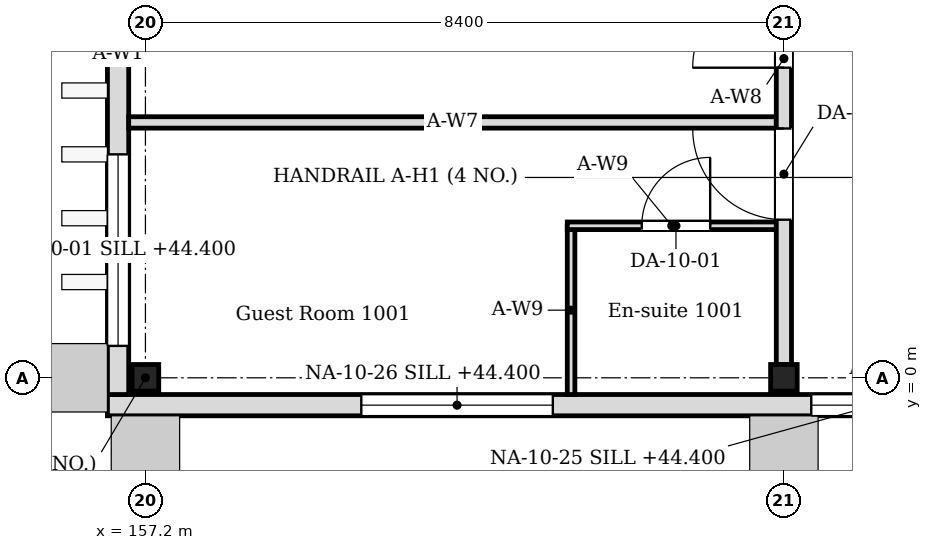
"""IFC4 building model, lengths in metres.
Left out: names, types, materials, properties, quantities, classifications, styles, units other than length and angle.
Written with IfcOpenShell. Run it as: python <this file> out.ifc"""

import sys

from ifc_helpers import new_model, si_unit, direction, frame, frame_2d, origin, origin_2d, place, context, subcontext, project, spatial, rectangle, i_section, extrude, element, fill, save


model = new_model("IFC4")
c1 = context("Model", 3, precision=1e-05, world=origin(), true_north=direction((0.0, 1.0)))
c2 = subcontext(c1, "Body", "Model", "MODEL_VIEW")
j1 = project(units=[si_unit("LENGTHUNIT", "METRE"), si_unit("PLANEANGLEUNIT", "RADIAN")], contexts=[c1])
p1 = place(None, origin())
s1 = spatial("IfcSite", under=j1, at=p1, CompositionType="ELEMENT")
p2 = place(p1, origin())
s2 = spatial("IfcBuilding", under=s1, at=p2, CompositionType="ELEMENT")
p3 = place(p2, frame((0.0, 0.0, 43.8)))
s3 = spatial("IfcBuildingStorey", under=s2, at=p3, CompositionType="ELEMENT", Elevation=43.8)
for number, where, z_axis, x_axis in (
    (1, (157.2, 0.0, 0.0), (0.0, 0.0, 1.0), (1.0, 0.0, 0.0)),
    (2, (165.6, 0.0, 0.0), (0.0, 0.0, 1.0), (1.0, 0.0, 0.0)),
):
    element("IfcColumn", number, at=place(p3, frame(where, z_axis=z_axis, x_axis=x_axis)), inside=s3, PredefinedType="COLUMN", context=c2, shape_type="SweptSolid", body=[
        extrude(i_section(OverallWidth=0.35, OverallDepth=0.35, WebThickness=0.012, FlangeThickness=0.019, FilletRadius=0.013, at=origin_2d()), origin(), (0.0, 0.0, 1.0), 4.2),
    ])
p4 = place(p3, frame((156.84, -0.22, 0.0), z_axis=(0.0, 0.0, 1.0), x_axis=(0.0, 1.0, 0.0)))
e3 = element("IfcWall", 3, at=p4, inside=s3, PredefinedType="SOLIDWALL", context=c2, shape_type="SweptSolid", body=[
    extrude(rectangle(XDim=8.97, YDim=0.28, at=frame_2d((4.485, 0.0))), origin(), (0.0, 0.0, 1.0), 4.05),
])
p5 = place(p4, frame((0.64, 0.0, 0.6)))
e4 = element("IfcOpeningElement", 4, at=p5, cuts=e3, PredefinedType="OPENING", context=c2, shape_type="SweptSolid", body=[
    extrude(rectangle(XDim=2.52, YDim=2.4, at=frame_2d((1.26, 1.2))), frame((0.0, 0.15, 0.0), z_axis=(0.0, -1.0, 0.0), x_axis=(1.0, 0.0, 0.0)), (0.0, 0.0, 1.0), 0.3),
])
p6 = place(p4, frame((4.84, 0.0, 0.6)))
e5 = element("IfcOpeningElement", 5, at=p6, cuts=e3, PredefinedType="OPENING", context=c2, shape_type="SweptSolid", body=[
    extrude(rectangle(XDim=2.52, YDim=2.4, at=frame_2d((1.26, 1.2))), frame((0.0, 0.15, 0.0), z_axis=(0.0, -1.0, 0.0), x_axis=(1.0, 0.0, 0.0)), (0.0, 0.0, 1.0), 0.3),
])
p7 = place(p3, frame((156.7, -0.36, 0.0), z_axis=(0.0, 0.0, 1.0), x_axis=(1.0, 0.0, 0.0)))
e6 = element("IfcWall", 6, at=p7, inside=s3, PredefinedType="SOLIDWALL", context=c2, shape_type="SweptSolid", body=[
    extrude(rectangle(XDim=20.2, YDim=0.28, at=frame_2d((10.1, 0.0))), origin(), (0.0, 0.0, 1.0), 4.05),
])
p8 = place(p7, frame((9.26, 0.0, 0.6)))
e7 = element("IfcOpeningElement", 7, at=p8, cuts=e6, PredefinedType="OPENING", context=c2, shape_type="SweptSolid", body=[
    extrude(rectangle(XDim=1.68, YDim=2.4, at=frame_2d((0.84, 1.2))), frame((0.0, 0.15, 0.0), z_axis=(0.0, -1.0, 0.0), x_axis=(1.0, 0.0, 0.0)), (0.0, 0.0, 1.0), 0.3),
])
p9 = place(p7, frame((3.34, 0.0, 0.6)))
e8 = element("IfcOpeningElement", 8, at=p9, cuts=e6, PredefinedType="OPENING", context=c2, shape_type="SweptSolid", body=[
    extrude(rectangle(XDim=2.52, YDim=2.4, at=frame_2d((1.26, 1.2))), frame((0.0, 0.15, 0.0), z_axis=(0.0, -1.0, 0.0), x_axis=(1.0, 0.0, 0.0)), (0.0, 0.0, 1.0), 0.3),
])
p10 = place(p3, frame((162.8, -0.22, 0.0), z_axis=(0.0, 0.0, 1.0), x_axis=(0.0, 1.0, 0.0)))
e9 = element("IfcWall", 9, at=p10, inside=s3, PredefinedType="PARTITIONING", context=c2, shape_type="SweptSolid", body=[
    extrude(rectangle(XDim=2.22, YDim=0.1, at=frame_2d((1.11, 0.0))), origin(), (0.0, 0.0, 1.0), 4.05),
])
p11 = place(p3, frame((162.75, 2.0, 0.0), z_axis=(0.0, 0.0, 1.0), x_axis=(1.0, 0.0, 0.0)))
e10 = element("IfcWall", 10, at=p11, inside=s3, PredefinedType="PARTITIONING", context=c2, shape_type="SweptSolid", body=[
    extrude(rectangle(XDim=2.75, YDim=0.1, at=frame_2d((1.375, 0.0))), origin(), (0.0, 0.0, 1.0), 4.05),
])
p12 = place(p11, frame((0.98, 0.0, 0.0)))
e11 = element("IfcOpeningElement", 11, at=p12, cuts=e10, PredefinedType="OPENING", context=c2, shape_type="SweptSolid", body=[
    extrude(rectangle(XDim=0.9, YDim=2.1, at=frame_2d((0.45, 1.05))), frame((0.0, 0.06, 0.0), z_axis=(0.0, -1.0, 0.0), x_axis=(1.0, 0.0, 0.0)), (0.0, 0.0, 1.0), 0.12),
])
p13 = place(p3, frame((156.98, 3.36, 0.0), z_axis=(0.0, 0.0, 1.0), x_axis=(1.0, 0.0, 0.0)))
e12 = element("IfcWall", 12, at=p13, inside=s3, PredefinedType="PARTITIONING", context=c2, shape_type="SweptSolid", body=[
    extrude(rectangle(XDim=8.52, YDim=0.15, at=frame_2d((4.26, 0.0))), origin(), (0.0, 0.0, 1.0), 3.604),
])
p14 = place(p3, frame((165.6, 0.175, 0.0), z_axis=(0.0, 0.0, 1.0), x_axis=(0.0, 1.0, 0.0)))
e13 = element("IfcWall", 13, at=p14, inside=s3, PredefinedType="PARTITIONING", context=c2, shape_type="SweptSolid", body=[
    extrude(rectangle(XDim=8.05, YDim=0.2, at=frame_2d((4.025, 0.0))), origin(), (0.0, 0.0, 1.0), 3.45),
])
p15 = place(p14, frame((1.905, 0.0, 0.0)))
e14 = element("IfcOpeningElement", 14, at=p15, cuts=e13, PredefinedType="OPENING", context=c2, shape_type="SweptSolid", body=[
    extrude(rectangle(XDim=1.2, YDim=2.1, at=frame_2d((0.6, 1.05))), frame((0.0, 0.11, 0.0), z_axis=(0.0, -1.0, 0.0), x_axis=(1.0, 0.0, 0.0)), (0.0, 0.0, 1.0), 0.22),
])
p16 = place(p14, frame((3.905, 0.0, 0.0)))
e15 = element("IfcOpeningElement", 15, at=p16, cuts=e13, PredefinedType="OPENING", context=c2, shape_type="SweptSolid", body=[
    extrude(rectangle(XDim=1.2, YDim=2.1, at=frame_2d((0.6, 1.05))), frame((0.0, 0.11, 0.0), z_axis=(0.0, -1.0, 0.0), x_axis=(1.0, 0.0, 0.0)), (0.0, 0.0, 1.0), 0.22),
])
p17 = place(p5, origin())
e16 = element("IfcWindow", 16, at=p17, inside=s3, PartitioningType="SINGLE_PANEL", PredefinedType="WINDOW", context=c2, shape_type="SweptSolid", body=[
    extrude(rectangle(XDim=2.52, YDim=2.4, at=frame_2d((1.26, 1.2))), frame((0.0, 0.03, 0.0), z_axis=(0.0, -1.0, 0.0), x_axis=(1.0, 0.0, 0.0)), (0.0, 0.0, 1.0), 0.06),
])
fill(e4, e16)
p18 = place(p8, origin())
e17 = element("IfcWindow", 17, at=p18, inside=s3, PartitioningType="SINGLE_PANEL", PredefinedType="WINDOW", context=c2, shape_type="SweptSolid", body=[
    extrude(rectangle(XDim=1.68, YDim=2.4, at=frame_2d((0.84, 1.2))), frame((0.0, 0.03, 0.0), z_axis=(0.0, -1.0, 0.0), x_axis=(1.0, 0.0, 0.0)), (0.0, 0.0, 1.0), 0.06),
])
fill(e7, e17)
p19 = place(p9, origin())
e18 = element("IfcWindow", 18, at=p19, inside=s3, PartitioningType="SINGLE_PANEL", PredefinedType="WINDOW", context=c2, shape_type="SweptSolid", body=[
    extrude(rectangle(XDim=2.52, YDim=2.4, at=frame_2d((1.26, 1.2))), frame((0.0, 0.03, 0.0), z_axis=(0.0, -1.0, 0.0), x_axis=(1.0, 0.0, 0.0)), (0.0, 0.0, 1.0), 0.06),
])
fill(e8, e18)
p20 = place(p12, origin())
e19 = element("IfcDoor", 19, at=p20, inside=s3, OperationType="SINGLE_SWING_RIGHT", PredefinedType="DOOR", context=c2, shape_type="SweptSolid", body=[
    extrude(rectangle(XDim=0.9, YDim=2.1, at=frame_2d((0.45, 1.05))), frame((0.0, 0.025, 0.0), z_axis=(0.0, -1.0, 0.0), x_axis=(1.0, 0.0, 0.0)), (0.0, 0.0, 1.0), 0.05),
])
fill(e11, e19)
p21 = place(p15, origin())
e20 = element("IfcDoor", 20, at=p21, inside=s3, OperationType="SINGLE_SWING_RIGHT", PredefinedType="DOOR", context=c2, shape_type="SweptSolid", body=[
    extrude(rectangle(XDim=1.2, YDim=2.1, at=frame_2d((0.6, 1.05))), frame((0.0, 0.025, 0.0), z_axis=(0.0, -1.0, 0.0), x_axis=(1.0, 0.0, 0.0)), (0.0, 0.0, 1.0), 0.05),
])
fill(e14, e20)
p22 = place(p16, origin())
e21 = element("IfcDoor", 21, at=p22, inside=s3, OperationType="SINGLE_SWING_LEFT", PredefinedType="DOOR", context=c2, shape_type="SweptSolid", body=[
    extrude(rectangle(XDim=1.2, YDim=2.1, at=frame_2d((0.6, 1.05))), frame((0.0, 0.025, 0.0), z_axis=(0.0, -1.0, 0.0), x_axis=(1.0, 0.0, 0.0)), (0.0, 0.0, 1.0), 0.05),
])
fill(e15, e21)
save(model, sys.argv[1])
